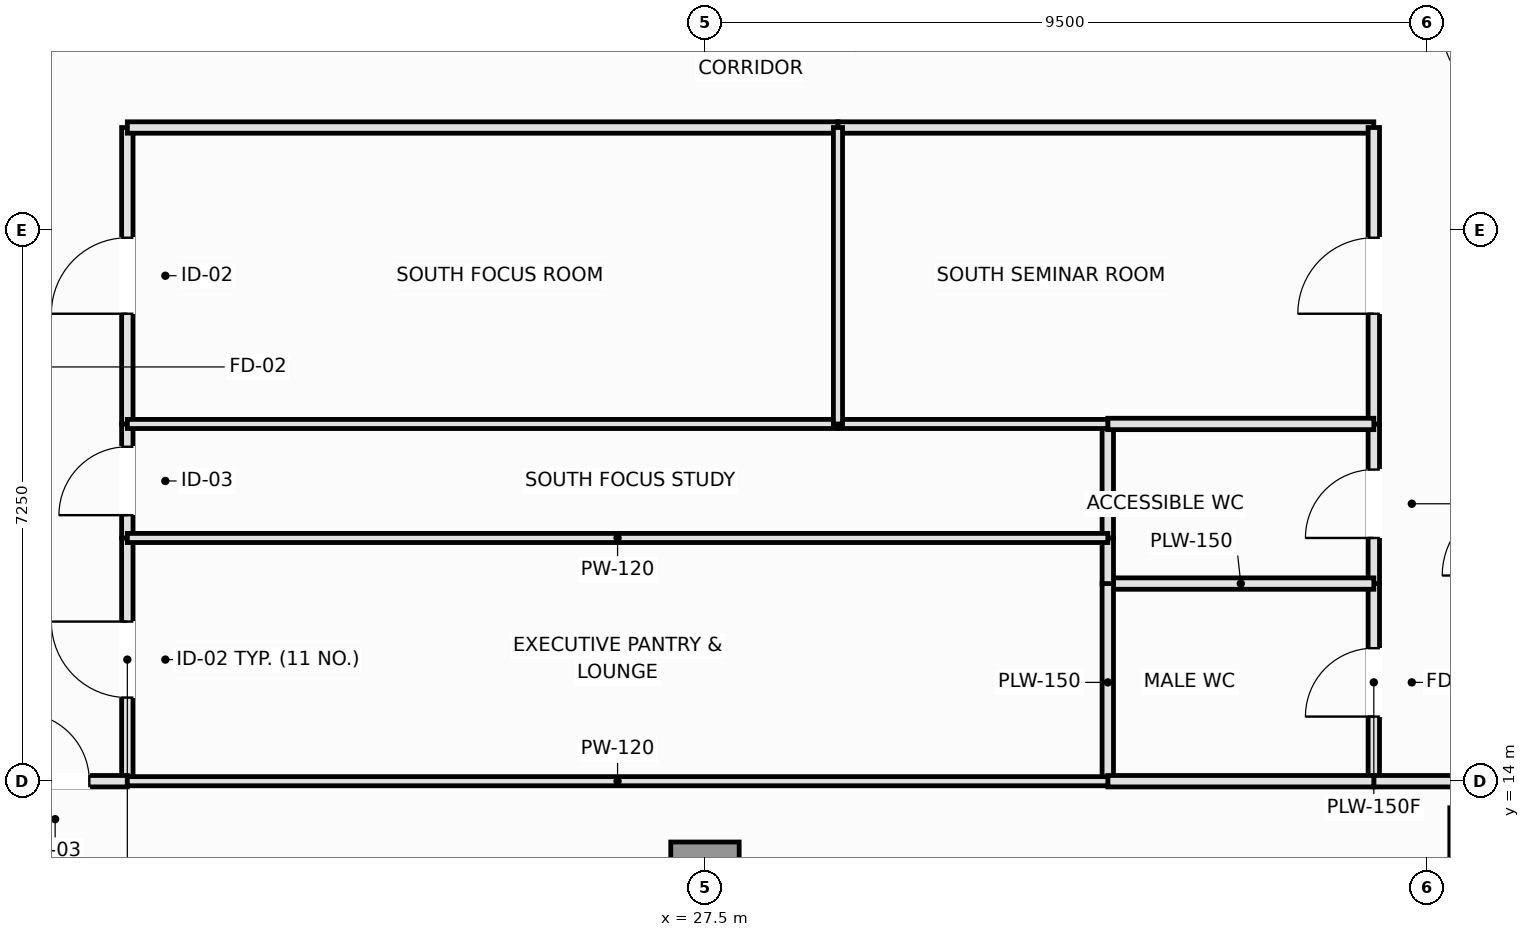
"""IFC4 building model, lengths in metres.
Left out: names, types, materials, properties, quantities, classifications, styles, units other than length and angle.
Written with IfcOpenShell. Run it as: python <this file> out.ifc"""

import sys

from ifc_helpers import new_model, si_unit, direction, frame, frame_2d, origin, origin_2d, place, context, subcontext, project, spatial, rectangle, extrude, element, fill, save


model = new_model("IFC4")
c1 = context("Model", 3, precision=1e-05, world=origin(), true_north=direction((0.0, 1.0)))
c2 = subcontext(c1, "Body", "Model", "MODEL_VIEW")
j1 = project(units=[si_unit("LENGTHUNIT", "METRE"), si_unit("PLANEANGLEUNIT", "RADIAN")], contexts=[c1])
p1 = place(None, origin())
s1 = spatial("IfcSite", under=j1, at=p1, CompositionType="ELEMENT")
p2 = place(p1, origin())
s2 = spatial("IfcBuilding", under=s1, at=p2, CompositionType="ELEMENT")
p3 = place(p2, frame((0.0, 0.0, 249.25)))
s3 = spatial("IfcBuildingStorey", under=s2, at=p3, CompositionType="ELEMENT", Elevation=249.25)
p4 = place(p3, frame((27.5, 12.75, 0.0), z_axis=(0.0, 0.0, 1.0), x_axis=(1.0, 0.0, 0.0)))
e1 = element("IfcColumn", 1, at=p4, inside=s3, PredefinedType="COLUMN", context=c2, shape_type="SweptSolid", body=[
    extrude(rectangle(XDim=0.9, YDim=0.9, at=origin_2d()), origin(), (0.0, 0.0, 1.0), 3.55),
])
p5 = place(p3, frame((19.9, 14.0, 0.0), z_axis=(0.0, 0.0, 1.0), x_axis=(0.0, 1.0, 0.0)))
e2 = element("IfcWall", 2, at=p5, inside=s3, PredefinedType="PARTITIONING", context=c2, shape_type="SweptSolid", body=[
    extrude(rectangle(XDim=3.2, YDim=0.15, at=frame_2d((1.6, 0.0))), origin(), (0.0, 0.0, 1.0), 3.39),
])
p6 = place(p5, frame((1.1, 0.0, 0.0)))
e3 = element("IfcOpeningElement", 3, at=p6, cuts=e2, PredefinedType="OPENING", context=c2, shape_type="SweptSolid", body=[
    extrude(rectangle(XDim=1.0, YDim=2.15, at=frame_2d((0.5, 1.075))), frame((0.0, 0.085, 0.0), z_axis=(0.0, -1.0, 0.0), x_axis=(1.0, 0.0, 0.0)), (0.0, 0.0, 1.0), 0.17),
])
p7 = place(p3, frame((19.9, 17.2, 0.0), z_axis=(0.0, 0.0, 1.0), x_axis=(0.0, 1.0, 0.0)))
e4 = element("IfcWall", 4, at=p7, inside=s3, PredefinedType="PARTITIONING", context=c2, shape_type="SweptSolid", body=[
    extrude(rectangle(XDim=1.5, YDim=0.15, at=frame_2d((0.75, 0.0))), origin(), (0.0, 0.0, 1.0), 3.39),
])
p8 = place(p7, frame((0.3, 0.0, 0.0)))
e5 = element("IfcOpeningElement", 5, at=p8, cuts=e4, PredefinedType="OPENING", context=c2, shape_type="SweptSolid", body=[
    extrude(rectangle(XDim=0.9, YDim=2.1, at=frame_2d((0.45, 1.05))), frame((0.0, 0.085, 0.0), z_axis=(0.0, -1.0, 0.0), x_axis=(1.0, 0.0, 0.0)), (0.0, 0.0, 1.0), 0.17),
])
p9 = place(p3, frame((19.9, 18.7, 0.0), z_axis=(0.0, 0.0, 1.0), x_axis=(0.0, 1.0, 0.0)))
e6 = element("IfcWall", 6, at=p9, inside=s3, PredefinedType="PARTITIONING", context=c2, shape_type="SweptSolid", body=[
    extrude(rectangle(XDim=3.9, YDim=0.15, at=frame_2d((1.95, 0.0))), origin(), (0.0, 0.0, 1.0), 3.39),
])
p10 = place(p9, frame((1.45, 0.0, 0.0)))
e7 = element("IfcOpeningElement", 7, at=p10, cuts=e6, PredefinedType="OPENING", context=c2, shape_type="SweptSolid", body=[
    extrude(rectangle(XDim=1.0, YDim=2.15, at=frame_2d((0.5, 1.075))), frame((0.0, 0.085, 0.0), z_axis=(0.0, -1.0, 0.0), x_axis=(1.0, 0.0, 0.0)), (0.0, 0.0, 1.0), 0.17),
])
p11 = place(p3, frame((18.0, 14.0, 0.0), z_axis=(0.0, 0.0, 1.0), x_axis=(1.0, 0.0, 0.0)))
e8 = element("IfcWall", 8, at=p11, inside=s3, PredefinedType="PARTITIONING", context=c2, shape_type="SweptSolid", body=[
    extrude(rectangle(XDim=1.9, YDim=0.15, at=frame_2d((0.95, 0.0))), origin(), (0.0, 0.0, 1.0), 3.39),
])
p12 = place(p11, frame((0.5, 0.0, 0.0)))
e9 = element("IfcOpeningElement", 9, at=p12, cuts=e8, PredefinedType="OPENING", context=c2, shape_type="SweptSolid", body=[
    extrude(rectangle(XDim=0.9, YDim=2.1, at=frame_2d((0.45, 1.05))), frame((0.0, 0.085, 0.0), z_axis=(0.0, -1.0, 0.0), x_axis=(1.0, 0.0, 0.0)), (0.0, 0.0, 1.0), 0.17),
])
p13 = place(p3, frame((19.9, 22.6, 0.0), z_axis=(0.0, 0.0, 1.0), x_axis=(1.0, 0.0, 0.0)))
e10 = element("IfcWall", 10, at=p13, inside=s3, PredefinedType="PARTITIONING", context=c2, shape_type="SweptSolid", body=[
    extrude(rectangle(XDim=9.35, YDim=0.15, at=frame_2d((4.675, 0.0))), origin(), (0.0, 0.0, 1.0), 3.39),
])
p14 = place(p3, frame((29.25, 22.6, 0.0), z_axis=(0.0, 0.0, 1.0), x_axis=(1.0, 0.0, 0.0)))
e11 = element("IfcWall", 11, at=p14, inside=s3, PredefinedType="PARTITIONING", context=c2, shape_type="SweptSolid", body=[
    extrude(rectangle(XDim=7.05, YDim=0.15, at=frame_2d((3.525, 0.0))), origin(), (0.0, 0.0, 1.0), 3.39),
])
p15 = place(p3, frame((36.3, 14.0, 0.0), z_axis=(0.0, 0.0, 1.0), x_axis=(0.0, 1.0, 0.0)))
e12 = element("IfcWall", 12, at=p15, inside=s3, PredefinedType="PLUMBINGWALL", context=c2, shape_type="SweptSolid", body=[
    extrude(rectangle(XDim=2.6, YDim=0.15, at=frame_2d((1.3, 0.0))), origin(), (0.0, 0.0, 1.0), 3.39),
])
p16 = place(p15, frame((0.85, 0.0, 0.0)))
e13 = element("IfcOpeningElement", 13, at=p16, cuts=e12, PredefinedType="OPENING", context=c2, shape_type="SweptSolid", body=[
    extrude(rectangle(XDim=0.9, YDim=2.1, at=frame_2d((0.45, 1.05))), frame((0.0, 0.085, 0.0), z_axis=(0.0, -1.0, 0.0), x_axis=(1.0, 0.0, 0.0)), (0.0, 0.0, 1.0), 0.17),
])
p17 = place(p3, frame((36.3, 16.6, 0.0), z_axis=(0.0, 0.0, 1.0), x_axis=(0.0, 1.0, 0.0)))
e14 = element("IfcWall", 14, at=p17, inside=s3, PredefinedType="PLUMBINGWALL", context=c2, shape_type="SweptSolid", body=[
    extrude(rectangle(XDim=2.1, YDim=0.15, at=frame_2d((1.05, 0.0))), origin(), (0.0, 0.0, 1.0), 3.39),
])
p18 = place(p17, frame((0.6, 0.0, 0.0)))
e15 = element("IfcOpeningElement", 15, at=p18, cuts=e14, PredefinedType="OPENING", context=c2, shape_type="SweptSolid", body=[
    extrude(rectangle(XDim=0.9, YDim=2.1, at=frame_2d((0.45, 1.05))), frame((0.0, 0.085, 0.0), z_axis=(0.0, -1.0, 0.0), x_axis=(1.0, 0.0, 0.0)), (0.0, 0.0, 1.0), 0.17),
])
p19 = place(p3, frame((36.3, 18.7, 0.0), z_axis=(0.0, 0.0, 1.0), x_axis=(0.0, 1.0, 0.0)))
e16 = element("IfcWall", 16, at=p19, inside=s3, PredefinedType="PARTITIONING", context=c2, shape_type="SweptSolid", body=[
    extrude(rectangle(XDim=3.9, YDim=0.15, at=frame_2d((1.95, 0.0))), origin(), (0.0, 0.0, 1.0), 3.39),
])
p20 = place(p19, frame((1.45, 0.0, 0.0)))
e17 = element("IfcOpeningElement", 17, at=p20, cuts=e16, PredefinedType="OPENING", context=c2, shape_type="SweptSolid", body=[
    extrude(rectangle(XDim=1.0, YDim=2.15, at=frame_2d((0.5, 1.075))), frame((0.0, 0.085, 0.0), z_axis=(0.0, -1.0, 0.0), x_axis=(1.0, 0.0, 0.0)), (0.0, 0.0, 1.0), 0.17),
])
p21 = place(p3, frame((36.3, 14.0, 0.0), z_axis=(0.0, 0.0, 1.0), x_axis=(1.0, 0.0, 0.0)))
e18 = element("IfcWall", 18, at=p21, inside=s3, PredefinedType="PARTITIONING", context=c2, shape_type="SweptSolid", body=[
    extrude(rectangle(XDim=1.9, YDim=0.15, at=frame_2d((0.95, 0.0))), origin(), (0.0, 0.0, 1.0), 3.39),
])
p22 = place(p3, frame((32.8, 16.6, 0.0), z_axis=(0.0, 0.0, 1.0), x_axis=(1.0, 0.0, 0.0)))
e19 = element("IfcWall", 19, at=p22, inside=s3, PredefinedType="PLUMBINGWALL", context=c2, shape_type="SweptSolid", body=[
    extrude(rectangle(XDim=3.5, YDim=0.15, at=frame_2d((1.75, 0.0))), origin(), (0.0, 0.0, 1.0), 3.39),
])
p23 = place(p3, frame((32.8, 14.0, 0.0), z_axis=(0.0, 0.0, 1.0), x_axis=(0.0, 1.0, 0.0)))
e20 = element("IfcWall", 20, at=p23, inside=s3, PredefinedType="PLUMBINGWALL", context=c2, shape_type="SweptSolid", body=[
    extrude(rectangle(XDim=2.6, YDim=0.15, at=frame_2d((1.3, 0.0))), origin(), (0.0, 0.0, 1.0), 3.39),
])
p24 = place(p3, frame((32.8, 14.0, 0.0), z_axis=(0.0, 0.0, 1.0), x_axis=(1.0, 0.0, 0.0)))
e21 = element("IfcWall", 21, at=p24, inside=s3, PredefinedType="PLUMBINGWALL", context=c2, shape_type="SweptSolid", body=[
    extrude(rectangle(XDim=3.5, YDim=0.15, at=frame_2d((1.75, 0.0))), origin(), (0.0, 0.0, 1.0), 3.39),
])
p25 = place(p3, frame((32.8, 16.6, 0.0), z_axis=(0.0, 0.0, 1.0), x_axis=(0.0, 1.0, 0.0)))
e22 = element("IfcWall", 22, at=p25, inside=s3, PredefinedType="PLUMBINGWALL", context=c2, shape_type="SweptSolid", body=[
    extrude(rectangle(XDim=0.6, YDim=0.15, at=frame_2d((0.3, 0.0))), origin(), (0.0, 0.0, 1.0), 3.39),
])
p26 = place(p3, frame((32.8, 17.2, 0.0), z_axis=(0.0, 0.0, 1.0), x_axis=(0.0, 1.0, 0.0)))
e23 = element("IfcWall", 23, at=p26, inside=s3, PredefinedType="PLUMBINGWALL", context=c2, shape_type="SweptSolid", body=[
    extrude(rectangle(XDim=1.5, YDim=0.15, at=frame_2d((0.75, 0.0))), origin(), (0.0, 0.0, 1.0), 3.39),
])
p27 = place(p3, frame((32.8, 18.7, 0.0), z_axis=(0.0, 0.0, 1.0), x_axis=(1.0, 0.0, 0.0)))
e24 = element("IfcWall", 24, at=p27, inside=s3, PredefinedType="PLUMBINGWALL", context=c2, shape_type="SweptSolid", body=[
    extrude(rectangle(XDim=3.5, YDim=0.15, at=frame_2d((1.75, 0.0))), origin(), (0.0, 0.0, 1.0), 3.39),
])
for number, where, z_axis, x_axis in (
    (25, (19.9, 17.2, 0.0), (0.0, 0.0, 1.0), (1.0, 0.0, 0.0)),
    (26, (19.9, 14.0, 0.0), (0.0, 0.0, 1.0), (1.0, 0.0, 0.0)),
):
    element("IfcWall", number, at=place(p3, frame(where, z_axis=z_axis, x_axis=x_axis)), inside=s3, PredefinedType="PARTITIONING", context=c2, shape_type="SweptSolid", body=[
        extrude(rectangle(XDim=12.9, YDim=0.12, at=frame_2d((6.45, 0.0))), origin(), (0.0, 0.0, 1.0), 3.39),
    ])
p28 = place(p3, frame((19.9, 18.7, 0.0), z_axis=(0.0, 0.0, 1.0), x_axis=(1.0, 0.0, 0.0)))
e27 = element("IfcWall", 27, at=p28, inside=s3, PredefinedType="PARTITIONING", context=c2, shape_type="SweptSolid", body=[
    extrude(rectangle(XDim=9.35, YDim=0.12, at=frame_2d((4.675, 0.0))), origin(), (0.0, 0.0, 1.0), 3.39),
])
p29 = place(p3, frame((29.25, 18.7, 0.0), z_axis=(0.0, 0.0, 1.0), x_axis=(1.0, 0.0, 0.0)))
e28 = element("IfcWall", 28, at=p29, inside=s3, PredefinedType="PARTITIONING", context=c2, shape_type="SweptSolid", body=[
    extrude(rectangle(XDim=3.55, YDim=0.12, at=frame_2d((1.775, 0.0))), origin(), (0.0, 0.0, 1.0), 3.39),
])
p30 = place(p3, frame((29.25, 18.7, 0.0), z_axis=(0.0, 0.0, 1.0), x_axis=(0.0, 1.0, 0.0)))
e29 = element("IfcWall", 29, at=p30, inside=s3, PredefinedType="PARTITIONING", context=c2, shape_type="SweptSolid", body=[
    extrude(rectangle(XDim=3.9, YDim=0.12, at=frame_2d((1.95, 0.0))), origin(), (0.0, 0.0, 1.0), 3.12),
])
p31 = place(p6, origin())
e30 = element("IfcDoor", 30, at=p31, inside=s3, OperationType="SINGLE_SWING_RIGHT", PredefinedType="DOOR", context=c2, shape_type="SweptSolid", body=[
    extrude(rectangle(XDim=1.0, YDim=2.15, at=frame_2d((0.5, 1.075))), frame((0.0, 0.025, 0.0), z_axis=(0.0, -1.0, 0.0), x_axis=(1.0, 0.0, 0.0)), (0.0, 0.0, 1.0), 0.05),
])
fill(e3, e30)
p32 = place(p8, origin())
e31 = element("IfcDoor", 31, at=p32, inside=s3, OperationType="SINGLE_SWING_LEFT", PredefinedType="DOOR", context=c2, shape_type="SweptSolid", body=[
    extrude(rectangle(XDim=0.9, YDim=2.1, at=frame_2d((0.45, 1.05))), frame((0.0, 0.025, 0.0), z_axis=(0.0, -1.0, 0.0), x_axis=(1.0, 0.0, 0.0)), (0.0, 0.0, 1.0), 0.05),
])
fill(e5, e31)
p33 = place(p10, origin())
e32 = element("IfcDoor", 32, at=p33, inside=s3, OperationType="SINGLE_SWING_LEFT", PredefinedType="DOOR", context=c2, shape_type="SweptSolid", body=[
    extrude(rectangle(XDim=1.0, YDim=2.15, at=frame_2d((0.5, 1.075))), frame((0.0, 0.025, 0.0), z_axis=(0.0, -1.0, 0.0), x_axis=(1.0, 0.0, 0.0)), (0.0, 0.0, 1.0), 0.05),
])
fill(e7, e32)
p34 = place(p12, origin())
e33 = element("IfcDoor", 33, at=p34, inside=s3, OperationType="SINGLE_SWING_LEFT", PredefinedType="DOOR", context=c2, shape_type="SweptSolid", body=[
    extrude(rectangle(XDim=0.9, YDim=2.1, at=frame_2d((0.45, 1.05))), frame((0.0, 0.025, 0.0), z_axis=(0.0, -1.0, 0.0), x_axis=(1.0, 0.0, 0.0)), (0.0, 0.0, 1.0), 0.05),
])
fill(e9, e33)
p35 = place(p16, origin())
e34 = element("IfcDoor", 34, at=p35, inside=s3, OperationType="SINGLE_SWING_LEFT", PredefinedType="DOOR", context=c2, shape_type="SweptSolid", body=[
    extrude(rectangle(XDim=0.9, YDim=2.1, at=frame_2d((0.45, 1.05))), frame((0.0, 0.025, 0.0), z_axis=(0.0, -1.0, 0.0), x_axis=(1.0, 0.0, 0.0)), (0.0, 0.0, 1.0), 0.05),
])
fill(e13, e34)
p36 = place(p18, origin())
e35 = element("IfcDoor", 35, at=p36, inside=s3, OperationType="SINGLE_SWING_LEFT", PredefinedType="DOOR", context=c2, shape_type="SweptSolid", body=[
    extrude(rectangle(XDim=0.9, YDim=2.1, at=frame_2d((0.45, 1.05))), frame((0.0, 0.025, 0.0), z_axis=(0.0, -1.0, 0.0), x_axis=(1.0, 0.0, 0.0)), (0.0, 0.0, 1.0), 0.05),
])
fill(e15, e35)
p37 = place(p20, origin())
e36 = element("IfcDoor", 36, at=p37, inside=s3, OperationType="SINGLE_SWING_LEFT", PredefinedType="DOOR", context=c2, shape_type="SweptSolid", body=[
    extrude(rectangle(XDim=1.0, YDim=2.15, at=frame_2d((0.5, 1.075))), frame((0.0, 0.025, 0.0), z_axis=(0.0, -1.0, 0.0), x_axis=(1.0, 0.0, 0.0)), (0.0, 0.0, 1.0), 0.05),
])
fill(e17, e36)
save(model, sys.argv[1])
